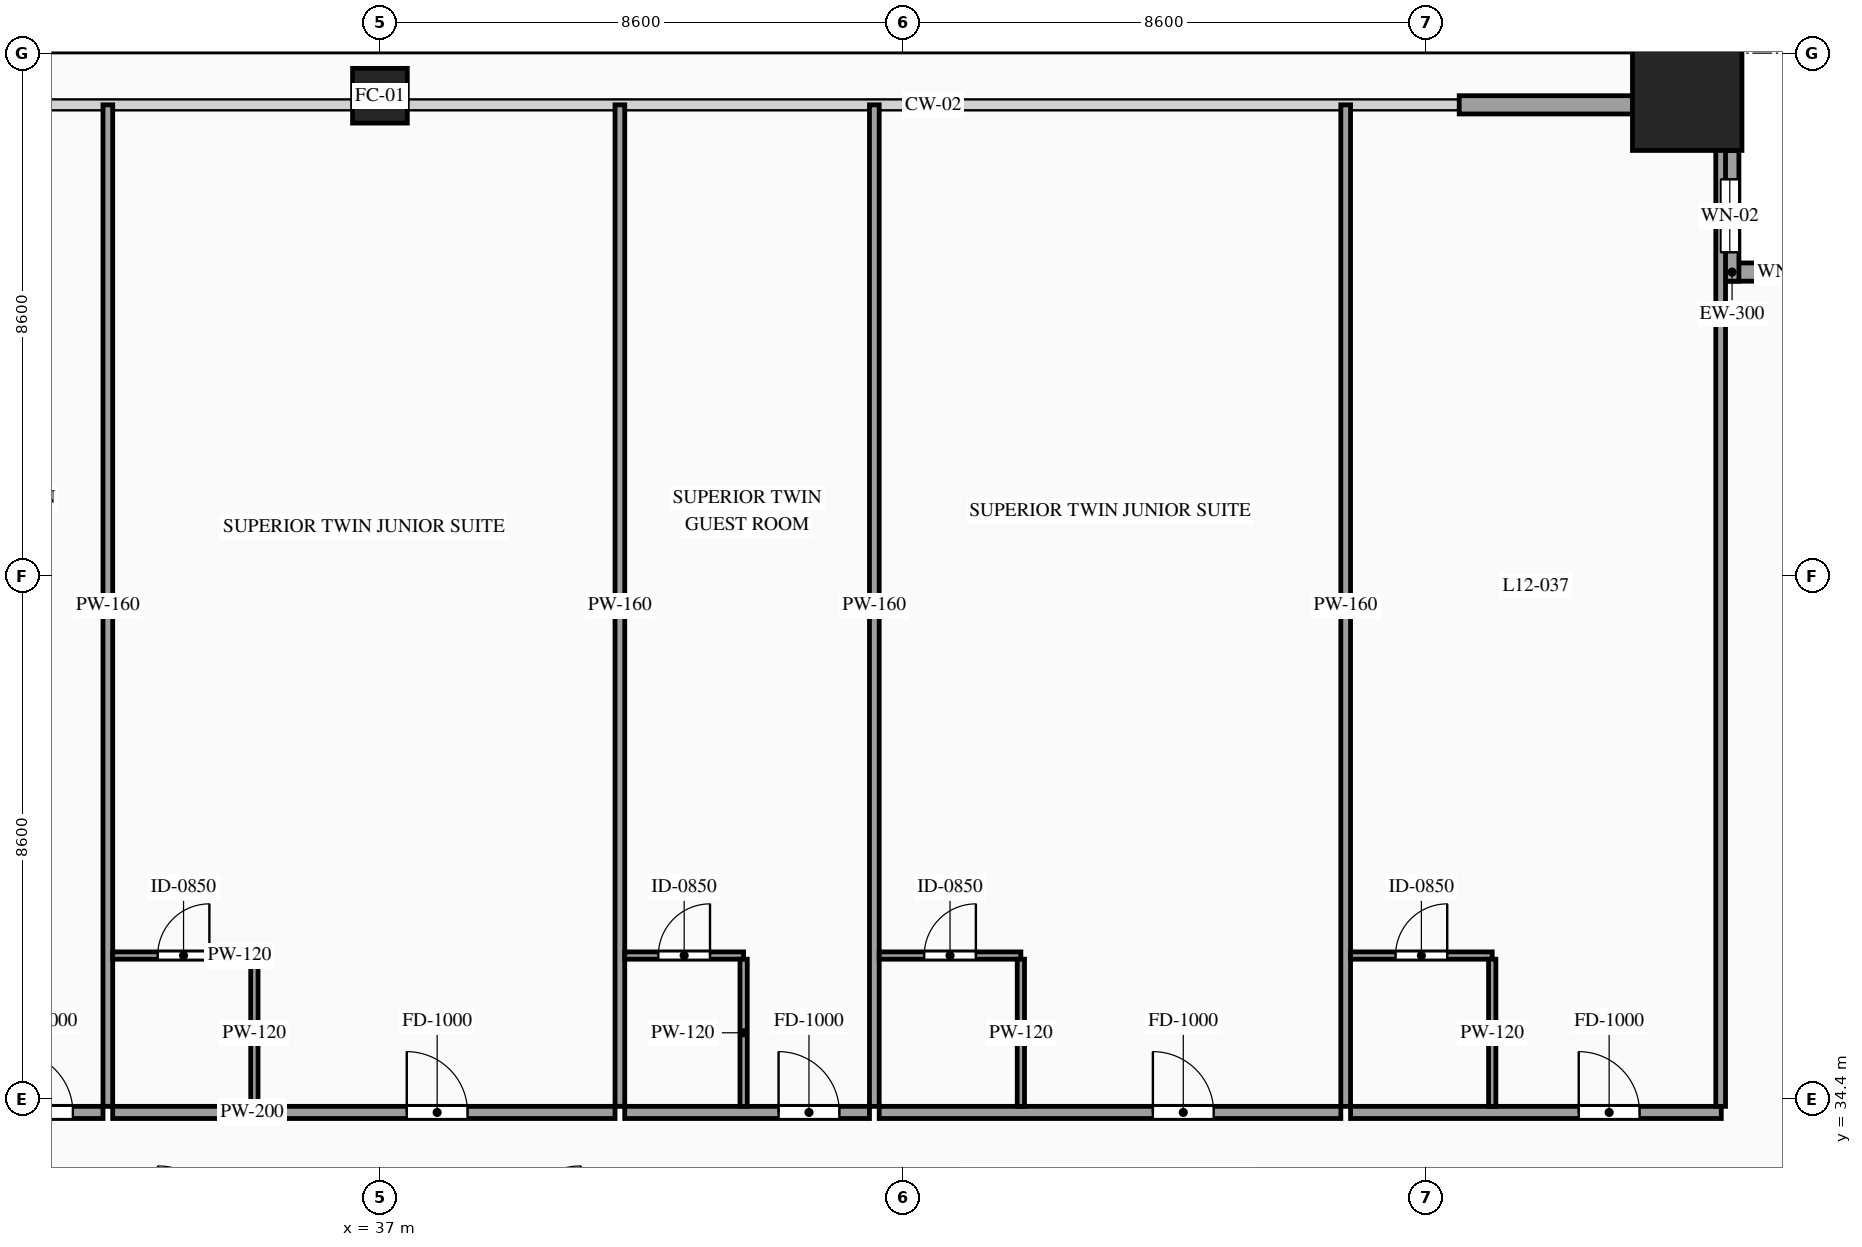
"""IFC4 building model, lengths in metres.
Left out: names, types, materials, properties, quantities, classifications, styles, units other than length and angle.
Written with IfcOpenShell. Run it as: python <this file> out.ifc"""

import sys

from ifc_helpers import new_model, si_unit, direction, frame, frame_2d, origin, origin_2d, place, context, subcontext, project, spatial, rectangle, hollow_rectangle, extrude, source, transform, mapped, element, fill, save


model = new_model("IFC4")
c1 = context("Model", 3, precision=1e-05, world=origin(), true_north=direction((0.0, 1.0)))
c2 = subcontext(c1, "Body", "Model", "MODEL_VIEW")
j1 = project(units=[si_unit("LENGTHUNIT", "METRE"), si_unit("PLANEANGLEUNIT", "RADIAN")], contexts=[c1])
p1 = place(None, origin())
s1 = spatial("IfcSite", under=j1, at=p1, CompositionType="ELEMENT")
p2 = place(p1, origin())
s2 = spatial("IfcBuilding", under=s1, at=p2, CompositionType="ELEMENT")
p3 = place(p2, frame((0.0, 0.0, 49.6)))
s3 = spatial("IfcBuildingStorey", under=s2, at=p3, CompositionType="ELEMENT", Elevation=49.6)
m1 = source(origin(), c2, "Body", "SweptSolid", [
    extrude(hollow_rectangle(XDim=0.9, YDim=0.9, WallThickness=0.042, at=origin_2d()), origin(), (0.0, 0.0, 1.0), 3.6),
])
p4 = place(p3, frame((37.0, 50.9, 0.0), z_axis=(0.0, 0.0, 1.0), x_axis=(1.0, 0.0, 0.0)))
e1 = element("IfcColumn", 1, at=p4, inside=s3, PredefinedType="COLUMN", context=c2, shape_type="MappedRepresentation", body=[
    mapped(m1, transform((0.0, 0.0, 0.0), scale=1.0)),
])
m2 = source(origin(), c2, "Body", "SweptSolid", [
    extrude(hollow_rectangle(XDim=1.8, YDim=1.8, WallThickness=0.08, at=origin_2d()), origin(), (0.0, 0.0, 1.0), 3.6),
])
p5 = place(p3, frame((58.5, 50.9, 0.0), z_axis=(0.0, 0.0, 1.0), x_axis=(1.0, 0.0, 0.0)))
e2 = element("IfcColumn", 2, at=p5, inside=s3, PredefinedType="COLUMN", context=c2, shape_type="MappedRepresentation", body=[
    mapped(m2, transform((0.0, 0.0, 0.0), scale=1.0)),
])
p6 = place(p3, frame((61.2, 48.0, 0.0), z_axis=(0.0, 0.0, 1.0), x_axis=(-1.0, 0.0, 0.0)))
e3 = element("IfcWall", 3, at=p6, inside=s3, PredefinedType="SOLIDWALL", context=c2, shape_type="SweptSolid", body=[
    extrude(rectangle(XDim=2.15, YDim=0.3, at=frame_2d((1.075, 0.0))), origin(), (0.0, 0.0, 1.0), 3.38),
])
p7 = place(p6, frame((0.625, 0.0, 0.85)))
e4 = element("IfcOpeningElement", 4, at=p7, cuts=e3, PredefinedType="OPENING", context=c2, shape_type="SweptSolid", body=[
    extrude(rectangle(XDim=0.9, YDim=1.5, at=frame_2d((0.45, 0.75))), frame((0.0, 0.165, 0.0), z_axis=(0.0, -1.0, 0.0), x_axis=(1.0, 0.0, 0.0)), (0.0, 0.0, 1.0), 0.33),
])
p8 = place(p3, frame((59.2, 47.85, 0.0), z_axis=(0.0, 0.0, 1.0), x_axis=(0.0, 1.0, 0.0)))
e5 = element("IfcWall", 5, at=p8, inside=s3, PredefinedType="SOLIDWALL", context=c2, shape_type="SweptSolid", body=[
    extrude(rectangle(XDim=2.15, YDim=0.3, at=frame_2d((1.075, 0.0))), origin(), (0.0, 0.0, 1.0), 3.38),
])
p9 = place(p8, frame((0.475, 0.0, 0.85)))
e6 = element("IfcOpeningElement", 6, at=p9, cuts=e5, PredefinedType="OPENING", context=c2, shape_type="SweptSolid", body=[
    extrude(rectangle(XDim=1.2, YDim=2.1, at=frame_2d((0.6, 1.05))), frame((0.0, 0.165, 0.0), z_axis=(0.0, -1.0, 0.0), x_axis=(1.0, 0.0, 0.0)), (0.0, 0.0, 1.0), 0.33),
])
m3 = source(origin(), c2, "Body", "SweptSolid", [
    extrude(rectangle(XDim=2.85, YDim=0.3, at=frame_2d((1.425, 0.0))), origin(), (0.0, 0.0, 1.0), 2.775),
])
p10 = place(p3, frame((54.75, 50.75, 0.0), z_axis=(0.0, 0.0, 1.0), x_axis=(1.0, 0.0, 0.0)))
e7 = element("IfcWall", 7, at=p10, inside=s3, PredefinedType="SOLIDWALL", context=c2, shape_type="MappedRepresentation", body=[
    mapped(m3, transform((0.0, 0.0, 0.0), scale=1.0)),
])
p11 = place(p3, frame((28.42, 34.18, 0.0), z_axis=(0.0, 0.0, 1.0), x_axis=(1.0, 0.0, 0.0)))
e8 = element("IfcWall", 8, at=p11, inside=s3, PredefinedType="PARTITIONING", context=c2, shape_type="SweptSolid", body=[
    extrude(rectangle(XDim=4.025, YDim=0.2, at=frame_2d((2.013, 0.0))), origin(), (0.0, 0.0, 1.0), 3.38),
])
p12 = place(p11, frame((2.53, 0.0, 0.0)))
e9 = element("IfcOpeningElement", 9, at=p12, cuts=e8, PredefinedType="OPENING", context=c2, shape_type="SweptSolid", body=[
    extrude(rectangle(XDim=1.0, YDim=2.2, at=frame_2d((0.5, 1.1))), frame((0.0, 0.115, 0.0), z_axis=(0.0, -1.0, 0.0), x_axis=(1.0, 0.0, 0.0)), (0.0, 0.0, 1.0), 0.23),
])
m4 = source(origin(), c2, "Body", "SweptSolid", [
    extrude(rectangle(XDim=16.47, YDim=0.16, at=frame_2d((8.235, 0.0))), origin(), (0.0, 0.0, 1.0), 3.38),
])
p13 = place(p3, frame((32.525, 34.28, 0.0), z_axis=(0.0, 0.0, 1.0), x_axis=(0.0, 1.0, 0.0)))
e10 = element("IfcWall", 10, at=p13, inside=s3, PredefinedType="PARTITIONING", context=c2, shape_type="MappedRepresentation", body=[
    mapped(m4, transform((0.0, 0.0, 0.0), scale=1.0)),
])
p14 = place(p3, frame((32.605, 34.18, 0.0), z_axis=(0.0, 0.0, 1.0), x_axis=(1.0, 0.0, 0.0)))
e11 = element("IfcWall", 11, at=p14, inside=s3, PredefinedType="PARTITIONING", context=c2, shape_type="SweptSolid", body=[
    extrude(rectangle(XDim=8.261, YDim=0.2, at=frame_2d((4.13, 0.0))), origin(), (0.0, 0.0, 1.0), 3.38),
])
p15 = place(p14, frame((4.836, 0.0, 0.0)))
e12 = element("IfcOpeningElement", 12, at=p15, cuts=e11, PredefinedType="OPENING", context=c2, shape_type="SweptSolid", body=[
    extrude(rectangle(XDim=1.0, YDim=2.2, at=frame_2d((0.5, 1.1))), frame((0.0, 0.115, 0.0), z_axis=(0.0, -1.0, 0.0), x_axis=(1.0, 0.0, 0.0)), (0.0, 0.0, 1.0), 0.23),
])
p16 = place(p3, frame((40.946, 34.28, 0.0), z_axis=(0.0, 0.0, 1.0), x_axis=(0.0, 1.0, 0.0)))
e13 = element("IfcWall", 13, at=p16, inside=s3, PredefinedType="PARTITIONING", context=c2, shape_type="MappedRepresentation", body=[
    mapped(m4, transform((0.0, 0.0, 0.0), scale=1.0)),
])
p17 = place(p3, frame((32.605, 36.76, 0.0), z_axis=(0.0, 0.0, 1.0), x_axis=(1.0, 0.0, 0.0)))
e14 = element("IfcWall", 14, at=p17, inside=s3, PredefinedType="PARTITIONING", context=c2, shape_type="SweptSolid", body=[
    extrude(rectangle(XDim=2.33, YDim=0.12, at=frame_2d((1.165, 0.0))), origin(), (0.0, 0.0, 1.0), 3.38),
])
p18 = place(p17, frame((0.74, 0.0, 0.0)))
e15 = element("IfcOpeningElement", 15, at=p18, cuts=e14, PredefinedType="OPENING", context=c2, shape_type="SweptSolid", body=[
    extrude(rectangle(XDim=0.85, YDim=2.1, at=frame_2d((0.425, 1.05))), frame((0.0, 0.075, 0.0), z_axis=(0.0, -1.0, 0.0), x_axis=(1.0, 0.0, 0.0)), (0.0, 0.0, 1.0), 0.15),
])
m5 = source(origin(), c2, "Body", "SweptSolid", [
    extrude(rectangle(XDim=2.42, YDim=0.12, at=frame_2d((1.21, 0.0))), origin(), (0.0, 0.0, 1.0), 3.38),
])
p19 = place(p3, frame((34.935, 34.28, 0.0), z_axis=(0.0, 0.0, 1.0), x_axis=(0.0, 1.0, 0.0)))
e16 = element("IfcWall", 16, at=p19, inside=s3, PredefinedType="PARTITIONING", context=c2, shape_type="MappedRepresentation", body=[
    mapped(m5, transform((0.0, 0.0, 0.0), scale=1.0)),
])
p20 = place(p3, frame((41.026, 34.18, 0.0), z_axis=(0.0, 0.0, 1.0), x_axis=(1.0, 0.0, 0.0)))
e17 = element("IfcWall", 17, at=p20, inside=s3, PredefinedType="PARTITIONING", context=c2, shape_type="SweptSolid", body=[
    extrude(rectangle(XDim=4.025, YDim=0.2, at=frame_2d((2.013, 0.0))), origin(), (0.0, 0.0, 1.0), 3.38),
])
p21 = place(p20, frame((2.53, 0.0, 0.0)))
e18 = element("IfcOpeningElement", 18, at=p21, cuts=e17, PredefinedType="OPENING", context=c2, shape_type="SweptSolid", body=[
    extrude(rectangle(XDim=1.0, YDim=2.2, at=frame_2d((0.5, 1.1))), frame((0.0, 0.115, 0.0), z_axis=(0.0, -1.0, 0.0), x_axis=(1.0, 0.0, 0.0)), (0.0, 0.0, 1.0), 0.23),
])
p22 = place(p3, frame((45.131, 34.28, 0.0), z_axis=(0.0, 0.0, 1.0), x_axis=(0.0, 1.0, 0.0)))
e19 = element("IfcWall", 19, at=p22, inside=s3, PredefinedType="PARTITIONING", context=c2, shape_type="MappedRepresentation", body=[
    mapped(m4, transform((0.0, 0.0, 0.0), scale=1.0)),
])
p23 = place(p3, frame((41.026, 36.76, 0.0), z_axis=(0.0, 0.0, 1.0), x_axis=(1.0, 0.0, 0.0)))
e20 = element("IfcWall", 20, at=p23, inside=s3, PredefinedType="PARTITIONING", context=c2, shape_type="SweptSolid", body=[
    extrude(rectangle(XDim=1.955, YDim=0.12, at=frame_2d((0.978, 0.0))), origin(), (0.0, 0.0, 1.0), 3.38),
])
p24 = place(p23, frame((0.552, 0.0, 0.0)))
e21 = element("IfcOpeningElement", 21, at=p24, cuts=e20, PredefinedType="OPENING", context=c2, shape_type="SweptSolid", body=[
    extrude(rectangle(XDim=0.85, YDim=2.1, at=frame_2d((0.425, 1.05))), frame((0.0, 0.075, 0.0), z_axis=(0.0, -1.0, 0.0), x_axis=(1.0, 0.0, 0.0)), (0.0, 0.0, 1.0), 0.15),
])
p25 = place(p3, frame((42.981, 34.28, 0.0), z_axis=(0.0, 0.0, 1.0), x_axis=(0.0, 1.0, 0.0)))
e22 = element("IfcWall", 22, at=p25, inside=s3, PredefinedType="PARTITIONING", context=c2, shape_type="MappedRepresentation", body=[
    mapped(m5, transform((0.0, 0.0, 0.0), scale=1.0)),
])
p26 = place(p3, frame((45.211, 34.18, 0.0), z_axis=(0.0, 0.0, 1.0), x_axis=(1.0, 0.0, 0.0)))
e23 = element("IfcWall", 23, at=p26, inside=s3, PredefinedType="PARTITIONING", context=c2, shape_type="SweptSolid", body=[
    extrude(rectangle(XDim=7.592, YDim=0.2, at=frame_2d((3.796, 0.0))), origin(), (0.0, 0.0, 1.0), 3.38),
])
p27 = place(p26, frame((4.501, 0.0, 0.0)))
e24 = element("IfcOpeningElement", 24, at=p27, cuts=e23, PredefinedType="OPENING", context=c2, shape_type="SweptSolid", body=[
    extrude(rectangle(XDim=1.0, YDim=2.2, at=frame_2d((0.5, 1.1))), frame((0.0, 0.115, 0.0), z_axis=(0.0, -1.0, 0.0), x_axis=(1.0, 0.0, 0.0)), (0.0, 0.0, 1.0), 0.23),
])
p28 = place(p3, frame((52.883, 34.28, 0.0), z_axis=(0.0, 0.0, 1.0), x_axis=(0.0, 1.0, 0.0)))
e25 = element("IfcWall", 25, at=p28, inside=s3, PredefinedType="PARTITIONING", context=c2, shape_type="MappedRepresentation", body=[
    mapped(m4, transform((0.0, 0.0, 0.0), scale=1.0)),
])
p29 = place(p3, frame((45.211, 36.76, 0.0), z_axis=(0.0, 0.0, 1.0), x_axis=(1.0, 0.0, 0.0)))
e26 = element("IfcWall", 26, at=p29, inside=s3, PredefinedType="PARTITIONING", context=c2, shape_type="SweptSolid", body=[
    extrude(rectangle(XDim=2.33, YDim=0.12, at=frame_2d((1.165, 0.0))), origin(), (0.0, 0.0, 1.0), 3.38),
])
p30 = place(p29, frame((0.74, 0.0, 0.0)))
e27 = element("IfcOpeningElement", 27, at=p30, cuts=e26, PredefinedType="OPENING", context=c2, shape_type="SweptSolid", body=[
    extrude(rectangle(XDim=0.85, YDim=2.1, at=frame_2d((0.425, 1.05))), frame((0.0, 0.075, 0.0), z_axis=(0.0, -1.0, 0.0), x_axis=(1.0, 0.0, 0.0)), (0.0, 0.0, 1.0), 0.15),
])
p31 = place(p3, frame((47.541, 34.28, 0.0), z_axis=(0.0, 0.0, 1.0), x_axis=(0.0, 1.0, 0.0)))
e28 = element("IfcWall", 28, at=p31, inside=s3, PredefinedType="PARTITIONING", context=c2, shape_type="MappedRepresentation", body=[
    mapped(m5, transform((0.0, 0.0, 0.0), scale=1.0)),
])
p32 = place(p3, frame((52.963, 34.18, 0.0), z_axis=(0.0, 0.0, 1.0), x_axis=(1.0, 0.0, 0.0)))
e29 = element("IfcWall", 29, at=p32, inside=s3, PredefinedType="PARTITIONING", context=c2, shape_type="SweptSolid", body=[
    extrude(rectangle(XDim=6.097, YDim=0.2, at=frame_2d((3.049, 0.0))), origin(), (0.0, 0.0, 1.0), 3.38),
])
p33 = place(p32, frame((3.753, 0.0, 0.0)))
e30 = element("IfcOpeningElement", 30, at=p33, cuts=e29, PredefinedType="OPENING", context=c2, shape_type="SweptSolid", body=[
    extrude(rectangle(XDim=1.0, YDim=2.2, at=frame_2d((0.5, 1.1))), frame((0.0, 0.115, 0.0), z_axis=(0.0, -1.0, 0.0), x_axis=(1.0, 0.0, 0.0)), (0.0, 0.0, 1.0), 0.23),
])
m6 = source(origin(), c2, "Body", "SweptSolid", [
    extrude(rectangle(XDim=16.32, YDim=0.16, at=frame_2d((8.16, 0.0))), origin(), (0.0, 0.0, 1.0), 3.38),
])
p34 = place(p3, frame((59.05, 34.28, 0.0), z_axis=(0.0, 0.0, 1.0), x_axis=(0.0, 1.0, 0.0)))
e31 = element("IfcWall", 31, at=p34, inside=s3, PredefinedType="PARTITIONING", context=c2, shape_type="MappedRepresentation", body=[
    mapped(m6, transform((0.0, 0.0, 0.0), scale=1.0)),
])
p35 = place(p3, frame((52.963, 36.76, 0.0), z_axis=(0.0, 0.0, 1.0), x_axis=(1.0, 0.0, 0.0)))
e32 = element("IfcWall", 32, at=p35, inside=s3, PredefinedType="PARTITIONING", context=c2, shape_type="SweptSolid", body=[
    extrude(rectangle(XDim=2.33, YDim=0.12, at=frame_2d((1.165, 0.0))), origin(), (0.0, 0.0, 1.0), 3.38),
])
p36 = place(p35, frame((0.74, 0.0, 0.0)))
e33 = element("IfcOpeningElement", 33, at=p36, cuts=e32, PredefinedType="OPENING", context=c2, shape_type="SweptSolid", body=[
    extrude(rectangle(XDim=0.85, YDim=2.1, at=frame_2d((0.425, 1.05))), frame((0.0, 0.075, 0.0), z_axis=(0.0, -1.0, 0.0), x_axis=(1.0, 0.0, 0.0)), (0.0, 0.0, 1.0), 0.15),
])
p37 = place(p3, frame((55.293, 34.28, 0.0), z_axis=(0.0, 0.0, 1.0), x_axis=(0.0, 1.0, 0.0)))
e34 = element("IfcWall", 34, at=p37, inside=s3, PredefinedType="PARTITIONING", context=c2, shape_type="MappedRepresentation", body=[
    mapped(m5, transform((0.0, 0.0, 0.0), scale=1.0)),
])
m7 = source(origin(), c2, "Body", "SweptSolid", [
    extrude(rectangle(XDim=0.9, YDim=1.5, at=frame_2d((0.45, 0.75))), frame((0.0, 0.03, 0.0), z_axis=(0.0, -1.0, 0.0), x_axis=(1.0, 0.0, 0.0)), (0.0, 0.0, 1.0), 0.06),
])
p38 = place(p7, origin())
e35 = element("IfcWindow", 35, at=p38, inside=s3, PartitioningType="SINGLE_PANEL", PredefinedType="WINDOW", context=c2, shape_type="MappedRepresentation", body=[
    mapped(m7, transform((0.0, 0.0, 0.0), scale=1.0)),
])
fill(e4, e35)
m8 = source(origin(), c2, "Body", "SweptSolid", [
    extrude(rectangle(XDim=1.2, YDim=2.1, at=frame_2d((0.6, 1.05))), frame((0.0, 0.03, 0.0), z_axis=(0.0, -1.0, 0.0), x_axis=(1.0, 0.0, 0.0)), (0.0, 0.0, 1.0), 0.06),
])
p39 = place(p9, origin())
e36 = element("IfcWindow", 36, at=p39, inside=s3, PartitioningType="SINGLE_PANEL", PredefinedType="WINDOW", context=c2, shape_type="MappedRepresentation", body=[
    mapped(m8, transform((0.0, 0.0, 0.0), scale=1.0)),
])
fill(e6, e36)
m9 = source(origin(), c2, "Body", "SweptSolid", [
    extrude(rectangle(XDim=1.0, YDim=2.2, at=frame_2d((0.5, 1.1))), frame((0.0, 0.025, 0.0), z_axis=(0.0, -1.0, 0.0), x_axis=(1.0, 0.0, 0.0)), (0.0, 0.0, 1.0), 0.05),
])
p40 = place(p12, origin())
e37 = element("IfcDoor", 37, at=p40, inside=s3, OperationType="SINGLE_SWING_LEFT", PredefinedType="DOOR", context=c2, shape_type="MappedRepresentation", body=[
    mapped(m9, transform((0.0, 0.0, 0.0), scale=1.0)),
])
fill(e9, e37)
p41 = place(p15, origin())
e38 = element("IfcDoor", 38, at=p41, inside=s3, OperationType="SINGLE_SWING_LEFT", PredefinedType="DOOR", context=c2, shape_type="MappedRepresentation", body=[
    mapped(m9, transform((0.0, 0.0, 0.0), scale=1.0)),
])
fill(e12, e38)
m10 = source(origin(), c2, "Body", "SweptSolid", [
    extrude(rectangle(XDim=0.85, YDim=2.1, at=frame_2d((0.425, 1.05))), frame((0.0, 0.025, 0.0), z_axis=(0.0, -1.0, 0.0), x_axis=(1.0, 0.0, 0.0)), (0.0, 0.0, 1.0), 0.05),
])
p42 = place(p18, origin())
e39 = element("IfcDoor", 39, at=p42, inside=s3, OperationType="SINGLE_SWING_RIGHT", PredefinedType="DOOR", context=c2, shape_type="MappedRepresentation", body=[
    mapped(m10, transform((0.0, 0.0, 0.0), scale=1.0)),
])
fill(e15, e39)
p43 = place(p21, origin())
e40 = element("IfcDoor", 40, at=p43, inside=s3, OperationType="SINGLE_SWING_LEFT", PredefinedType="DOOR", context=c2, shape_type="MappedRepresentation", body=[
    mapped(m9, transform((0.0, 0.0, 0.0), scale=1.0)),
])
fill(e18, e40)
p44 = place(p24, origin())
e41 = element("IfcDoor", 41, at=p44, inside=s3, OperationType="SINGLE_SWING_RIGHT", PredefinedType="DOOR", context=c2, shape_type="MappedRepresentation", body=[
    mapped(m10, transform((0.0, 0.0, 0.0), scale=1.0)),
])
fill(e21, e41)
p45 = place(p27, origin())
e42 = element("IfcDoor", 42, at=p45, inside=s3, OperationType="SINGLE_SWING_LEFT", PredefinedType="DOOR", context=c2, shape_type="MappedRepresentation", body=[
    mapped(m9, transform((0.0, 0.0, 0.0), scale=1.0)),
])
fill(e24, e42)
p46 = place(p30, origin())
e43 = element("IfcDoor", 43, at=p46, inside=s3, OperationType="SINGLE_SWING_RIGHT", PredefinedType="DOOR", context=c2, shape_type="MappedRepresentation", body=[
    mapped(m10, transform((0.0, 0.0, 0.0), scale=1.0)),
])
fill(e27, e43)
p47 = place(p33, origin())
e44 = element("IfcDoor", 44, at=p47, inside=s3, OperationType="SINGLE_SWING_LEFT", PredefinedType="DOOR", context=c2, shape_type="MappedRepresentation", body=[
    mapped(m9, transform((0.0, 0.0, 0.0), scale=1.0)),
])
fill(e30, e44)
p48 = place(p36, origin())
e45 = element("IfcDoor", 45, at=p48, inside=s3, OperationType="SINGLE_SWING_RIGHT", PredefinedType="DOOR", context=c2, shape_type="MappedRepresentation", body=[
    mapped(m10, transform((0.0, 0.0, 0.0), scale=1.0)),
])
fill(e33, e45)
save(model, sys.argv[1])
